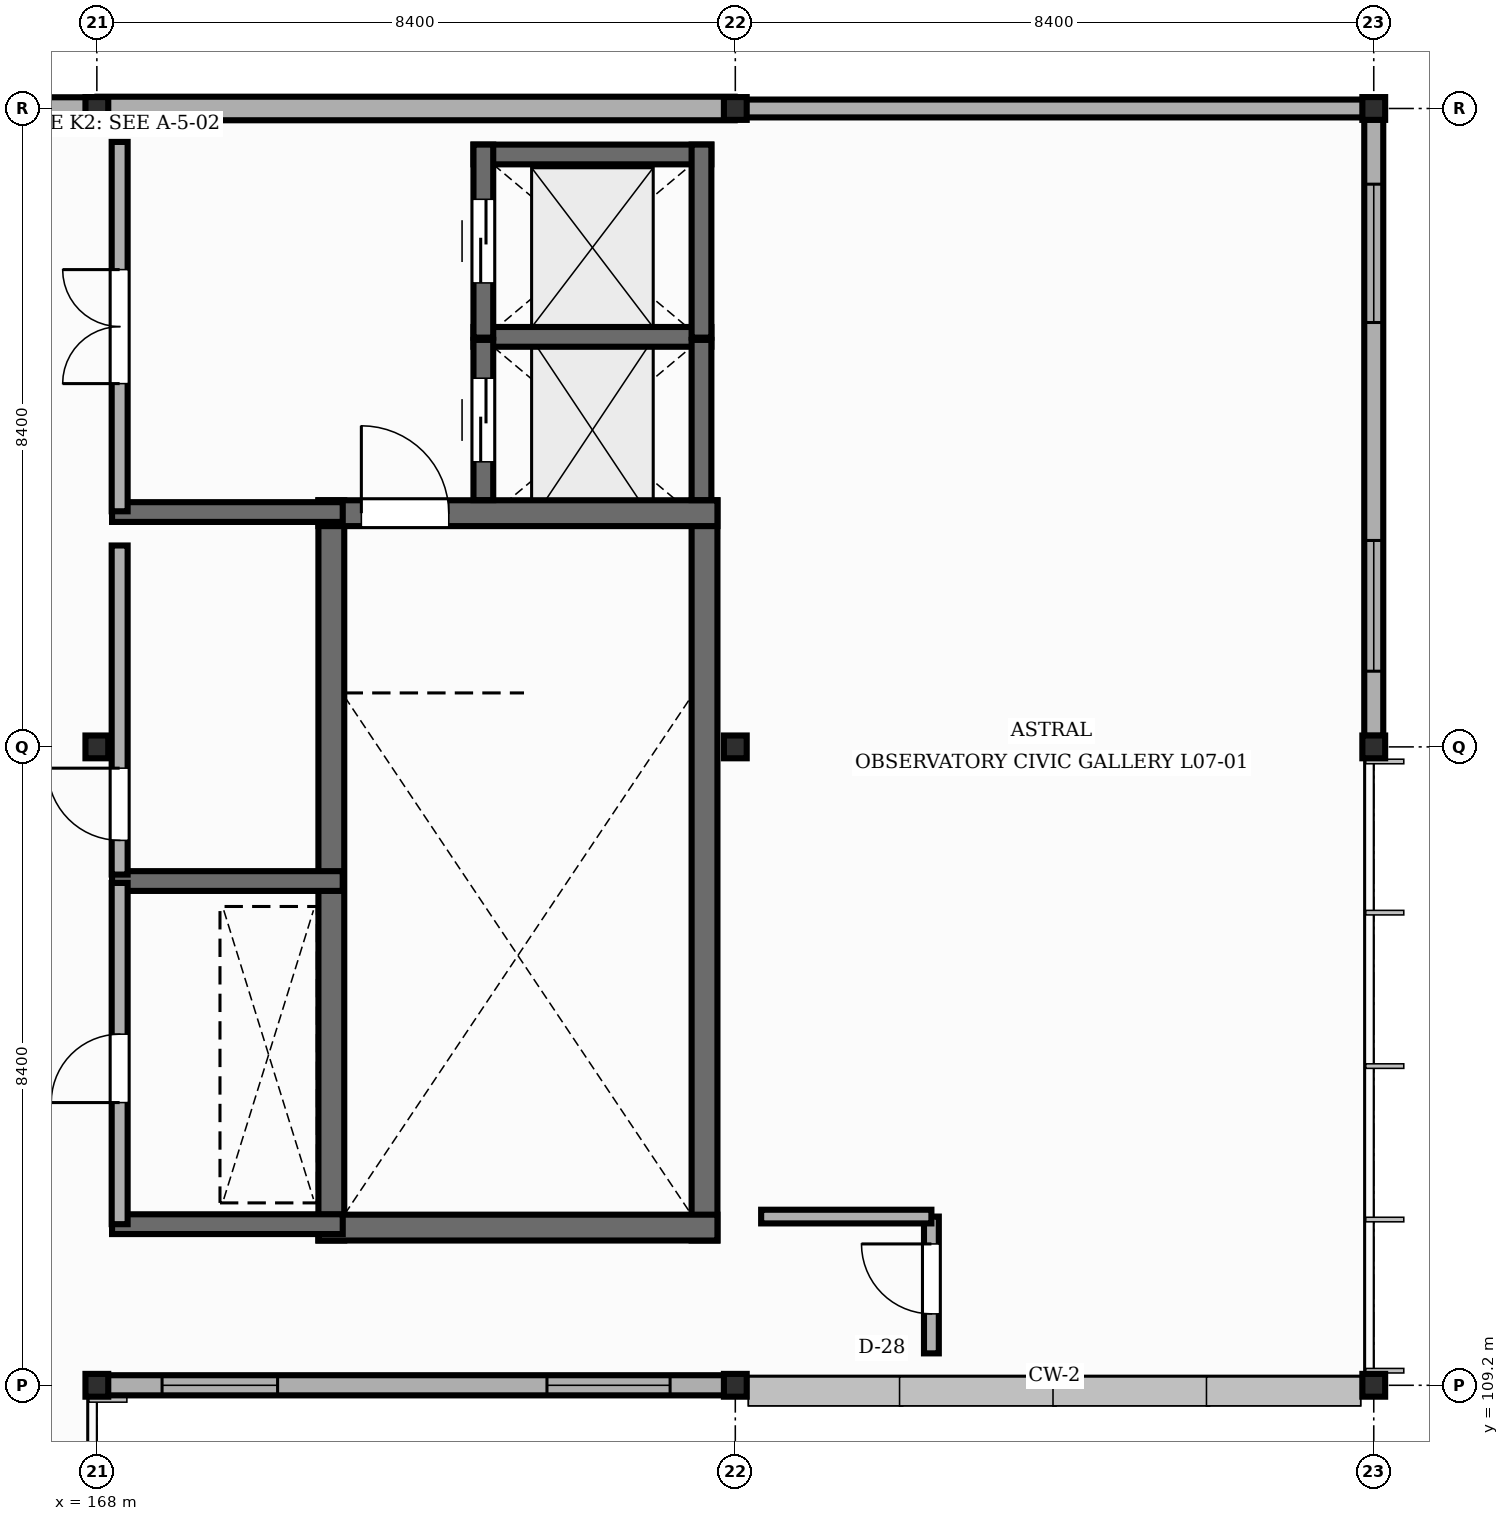
"""IFC4 building model, lengths in metres.
Left out: names, types, materials, properties, quantities, classifications, styles, units other than length and angle.
Written with IfcOpenShell. Run it as: python <this file> out.ifc"""

import sys

from ifc_helpers import new_model, si_unit, direction, frame, frame_2d, origin, origin_2d, place, context, subcontext, project, spatial, rectangle, i_section, extrude, element, fill, save


model = new_model("IFC4")
c1 = context("Model", 3, precision=1e-05, world=origin(), true_north=direction((0.0, 1.0)))
c2 = subcontext(c1, "Body", "Model", "MODEL_VIEW")
j1 = project(units=[si_unit("LENGTHUNIT", "METRE"), si_unit("PLANEANGLEUNIT", "RADIAN")], contexts=[c1])
p1 = place(None, origin())
s1 = spatial("IfcSite", under=j1, at=p1, CompositionType="ELEMENT")
p2 = place(p1, origin())
s2 = spatial("IfcBuilding", under=s1, at=p2, CompositionType="ELEMENT")
p3 = place(p2, frame((0.0, 0.0, 30.15)))
s3 = spatial("IfcBuildingStorey", under=s2, at=p3, CompositionType="ELEMENT", Elevation=30.15)
for number, where, z_axis, x_axis in (
    (1, (168.0, 109.2, 0.0), (0.0, 0.0, 1.0), (1.0, 0.0, 0.0)),
    (2, (168.0, 117.6, 0.0), (0.0, 0.0, 1.0), (1.0, 0.0, 0.0)),
    (3, (168.0, 126.0, 0.0), (0.0, 0.0, 1.0), (1.0, 0.0, 0.0)),
    (4, (176.4, 109.2, 0.0), (0.0, 0.0, 1.0), (1.0, 0.0, 0.0)),
    (5, (176.4, 117.6, 0.0), (0.0, 0.0, 1.0), (1.0, 0.0, 0.0)),
    (6, (176.4, 126.0, 0.0), (0.0, 0.0, 1.0), (1.0, 0.0, 0.0)),
    (7, (184.8, 109.2, 0.0), (0.0, 0.0, 1.0), (1.0, 0.0, 0.0)),
    (8, (184.8, 117.6, 0.0), (0.0, 0.0, 1.0), (1.0, 0.0, 0.0)),
    (9, (184.8, 126.0, 0.0), (0.0, 0.0, 1.0), (1.0, 0.0, 0.0)),
):
    element("IfcColumn", number, at=place(p3, frame(where, z_axis=z_axis, x_axis=x_axis)), inside=s3, PredefinedType="COLUMN", context=c2, shape_type="SweptSolid", body=[
        extrude(i_section(OverallWidth=0.3, OverallDepth=0.3, WebThickness=0.011, FlangeThickness=0.019, FilletRadius=0.027, at=origin_2d()), origin(), (0.0, 0.0, 1.0), 4.2),
    ])
p4 = place(p3, frame((168.008, 109.2, 0.0), z_axis=(0.0, 0.0, 1.0), x_axis=(1.0, 0.0, 0.0)))
e10 = element("IfcWall", 10, at=p4, inside=s3, PredefinedType="STANDARD", context=c2, shape_type="SweptSolid", body=[
    extrude(rectangle(XDim=8.384, YDim=0.265, at=frame_2d((4.192, 0.0))), origin(), (0.0, 0.0, 1.0), 3.692),
])
p5 = place(p4, frame((0.85, 0.0, 0.9)))
e11 = element("IfcOpeningElement", 11, at=p5, cuts=e10, PredefinedType="OPENING", context=c2, shape_type="SweptSolid", body=[
    extrude(rectangle(XDim=1.52, YDim=1.85, at=frame_2d((0.76, 0.925))), frame((0.0, 0.142, 0.0), z_axis=(0.0, -1.0, 0.0), x_axis=(1.0, 0.0, 0.0)), (0.0, 0.0, 1.0), 0.285),
])
p6 = place(p4, frame((5.914, 0.0, 0.9)))
e12 = element("IfcOpeningElement", 12, at=p6, cuts=e10, PredefinedType="OPENING", context=c2, shape_type="SweptSolid", body=[
    extrude(rectangle(XDim=1.62, YDim=1.85, at=frame_2d((0.81, 0.925))), frame((0.0, 0.142, 0.0), z_axis=(0.0, -1.0, 0.0), x_axis=(1.0, 0.0, 0.0)), (0.0, 0.0, 1.0), 0.285),
])
p7 = place(p3, frame((184.8, 117.746, 0.0), z_axis=(0.0, 0.0, 1.0), x_axis=(0.0, 1.0, 0.0)))
e13 = element("IfcWall", 13, at=p7, inside=s3, PredefinedType="STANDARD", context=c2, shape_type="SweptSolid", body=[
    extrude(rectangle(XDim=8.108, YDim=0.25, at=frame_2d((4.054, 0.0))), origin(), (0.0, 0.0, 1.0), 3.662),
])
p8 = place(p7, frame((0.85, 0.0, 0.9)))
e14 = element("IfcOpeningElement", 14, at=p8, cuts=e13, PredefinedType="OPENING", context=c2, shape_type="SweptSolid", body=[
    extrude(rectangle(XDim=1.72, YDim=1.85, at=frame_2d((0.86, 0.925))), frame((0.0, 0.135, 0.0), z_axis=(0.0, -1.0, 0.0), x_axis=(1.0, 0.0, 0.0)), (0.0, 0.0, 1.0), 0.27),
])
p9 = place(p7, frame((5.438, 0.0, 0.9)))
e15 = element("IfcOpeningElement", 15, at=p9, cuts=e13, PredefinedType="OPENING", context=c2, shape_type="SweptSolid", body=[
    extrude(rectangle(XDim=1.82, YDim=1.85, at=frame_2d((0.91, 0.925))), frame((0.0, 0.135, 0.0), z_axis=(0.0, -1.0, 0.0), x_axis=(1.0, 0.0, 0.0)), (0.0, 0.0, 1.0), 0.27),
])
p10 = place(p3, frame((184.792, 126.0, 0.0), z_axis=(0.0, 0.0, 1.0), x_axis=(-1.0, 0.0, 0.0)))
e16 = element("IfcWall", 16, at=p10, inside=s3, PredefinedType="STANDARD", context=c2, shape_type="SweptSolid", body=[
    extrude(rectangle(XDim=8.384, YDim=0.235, at=frame_2d((4.192, 0.0))), origin(), (0.0, 0.0, 1.0), 3.662),
])
p11 = place(p3, frame((176.392, 126.0, 0.0), z_axis=(0.0, 0.0, 1.0), x_axis=(-1.0, 0.0, 0.0)))
e17 = element("IfcWall", 17, at=p11, inside=s3, PredefinedType="STANDARD", context=c2, shape_type="SweptSolid", body=[
    extrude(rectangle(XDim=8.384, YDim=0.31, at=frame_2d((4.192, 0.0))), origin(), (0.0, 0.0, 1.0), 3.692),
])
p12 = place(p3, frame((167.992, 126.0, 0.0), z_axis=(0.0, 0.0, 1.0), x_axis=(-1.0, 0.0, 0.0)))
e18 = element("IfcWall", 18, at=p12, inside=s3, PredefinedType="STANDARD", context=c2, shape_type="SweptSolid", body=[
    extrude(rectangle(XDim=8.384, YDim=0.295, at=frame_2d((4.192, 0.0))), origin(), (0.0, 0.0, 1.0), 3.662),
])
for number, where, z_axis, x_axis in (
    (19, (171.085, 111.105, 0.0), (0.0, 0.0, 1.0), (0.0, 1.0, 0.0)),
    (20, (175.995, 111.105, 0.0), (0.0, 0.0, 1.0), (0.0, 1.0, 0.0)),
):
    element("IfcWall", number, at=place(p3, frame(where, z_axis=z_axis, x_axis=x_axis)), inside=s3, PredefinedType="SHEAR", context=c2, shape_type="SweptSolid", body=[
        extrude(rectangle(XDim=9.74, YDim=0.34, at=frame_2d((4.87, 0.0))), origin(), (0.0, 0.0, 1.0), 4.0),
    ])
p13 = place(p3, frame((170.915, 111.275, 0.0), z_axis=(0.0, 0.0, 1.0), x_axis=(1.0, 0.0, 0.0)))
e21 = element("IfcWall", 21, at=p13, inside=s3, PredefinedType="SHEAR", context=c2, shape_type="SweptSolid", body=[
    extrude(rectangle(XDim=5.25, YDim=0.34, at=frame_2d((2.625, 0.0))), origin(), (0.0, 0.0, 1.0), 4.0),
])
p14 = place(p3, frame((170.915, 120.675, 0.0), z_axis=(0.0, 0.0, 1.0), x_axis=(1.0, 0.0, 0.0)))
e22 = element("IfcWall", 22, at=p14, inside=s3, PredefinedType="SHEAR", context=c2, shape_type="SweptSolid", body=[
    extrude(rectangle(XDim=5.25, YDim=0.34, at=frame_2d((2.625, 0.0))), origin(), (0.0, 0.0, 1.0), 4.0),
])
p15 = place(p14, frame((0.565, 0.0, 0.0)))
e23 = element("IfcOpeningElement", 23, at=p15, cuts=e22, PredefinedType="OPENING", context=c2, shape_type="SweptSolid", body=[
    extrude(rectangle(XDim=1.15, YDim=2.15, at=frame_2d((0.575, 1.075))), frame((0.0, 0.18, 0.0), z_axis=(0.0, -1.0, 0.0), x_axis=(1.0, 0.0, 0.0)), (0.0, 0.0, 1.0), 0.36),
])
p16 = place(p3, frame((172.955, 122.995, 0.0), z_axis=(0.0, 0.0, 1.0), x_axis=(1.0, 0.0, 0.0)))
e24 = element("IfcWall", 24, at=p16, inside=s3, PredefinedType="SHEAR", context=c2, shape_type="SweptSolid", body=[
    extrude(rectangle(XDim=3.13, YDim=0.26, at=frame_2d((1.565, 0.0))), origin(), (0.0, 0.0, 1.0), 4.0),
])
p17 = place(p3, frame((175.955, 120.847, 0.0), z_axis=(0.0, 0.0, 1.0), x_axis=(0.0, 1.0, 0.0)))
e25 = element("IfcWall", 25, at=p17, inside=s3, PredefinedType="SHEAR", context=c2, shape_type="SweptSolid", body=[
    extrude(rectangle(XDim=2.108, YDim=0.26, at=frame_2d((1.054, 0.0))), origin(), (0.0, 0.0, 1.0), 4.0),
])
p18 = place(p3, frame((173.085, 120.847, 0.0), z_axis=(0.0, 0.0, 1.0), x_axis=(0.0, 1.0, 0.0)))
e26 = element("IfcWall", 26, at=p18, inside=s3, PredefinedType="SHEAR", context=c2, shape_type="SweptSolid", body=[
    extrude(rectangle(XDim=2.108, YDim=0.26, at=frame_2d((1.054, 0.0))), origin(), (0.0, 0.0, 1.0), 4.0),
])
p19 = place(p18, frame((0.504, 0.0, 0.0)))
e27 = element("IfcOpeningElement", 27, at=p19, cuts=e26, PredefinedType="OPENING", context=c2, shape_type="SweptSolid", body=[
    extrude(rectangle(XDim=1.1, YDim=2.15, at=frame_2d((0.55, 1.075))), frame((0.0, 0.14, 0.0), z_axis=(0.0, -1.0, 0.0), x_axis=(1.0, 0.0, 0.0)), (0.0, 0.0, 1.0), 0.28),
])
p20 = place(p3, frame((172.955, 125.395, 0.0), z_axis=(0.0, 0.0, 1.0), x_axis=(1.0, 0.0, 0.0)))
e28 = element("IfcWall", 28, at=p20, inside=s3, PredefinedType="SHEAR", context=c2, shape_type="SweptSolid", body=[
    extrude(rectangle(XDim=3.13, YDim=0.26, at=frame_2d((1.565, 0.0))), origin(), (0.0, 0.0, 1.0), 4.0),
])
p21 = place(p3, frame((175.955, 122.985, 0.0), z_axis=(0.0, 0.0, 1.0), x_axis=(0.0, 1.0, 0.0)))
e29 = element("IfcWall", 29, at=p21, inside=s3, PredefinedType="SHEAR", context=c2, shape_type="SweptSolid", body=[
    extrude(rectangle(XDim=2.54, YDim=0.26, at=frame_2d((1.27, 0.0))), origin(), (0.0, 0.0, 1.0), 4.0),
])
p22 = place(p3, frame((173.085, 122.985, 0.0), z_axis=(0.0, 0.0, 1.0), x_axis=(0.0, 1.0, 0.0)))
e30 = element("IfcWall", 30, at=p22, inside=s3, PredefinedType="SHEAR", context=c2, shape_type="SweptSolid", body=[
    extrude(rectangle(XDim=2.54, YDim=0.26, at=frame_2d((1.27, 0.0))), origin(), (0.0, 0.0, 1.0), 4.0),
])
p23 = place(p22, frame((0.72, 0.0, 0.0)))
e31 = element("IfcOpeningElement", 31, at=p23, cuts=e30, PredefinedType="OPENING", context=c2, shape_type="SweptSolid", body=[
    extrude(rectangle(XDim=1.1, YDim=2.15, at=frame_2d((0.55, 1.075))), frame((0.0, 0.14, 0.0), z_axis=(0.0, -1.0, 0.0), x_axis=(1.0, 0.0, 0.0)), (0.0, 0.0, 1.0), 0.28),
])
for number, where, z_axis, x_axis in (
    (32, (168.2, 111.32, 0.0), (0.0, 0.0, 1.0), (1.0, 0.0, 0.0)),
    (33, (168.2, 115.835, 0.0), (0.0, 0.0, 1.0), (1.0, 0.0, 0.0)),
    (34, (168.2, 120.69, 0.0), (0.0, 0.0, 1.0), (1.0, 0.0, 0.0)),
):
    element("IfcWall", number, at=place(p3, frame(where, z_axis=z_axis, x_axis=x_axis)), inside=s3, PredefinedType="SHEAR", context=c2, shape_type="SweptSolid", body=[
        extrude(rectangle(XDim=3.035, YDim=0.26, at=frame_2d((1.518, 0.0))), origin(), (0.0, 0.0, 1.0), 4.0),
    ])
p24 = place(p3, frame((168.3, 111.32, 0.0), z_axis=(0.0, 0.0, 1.0), x_axis=(0.0, 1.0, 0.0)))
e35 = element("IfcWall", 35, at=p24, inside=s3, PredefinedType="STANDARD", context=c2, shape_type="SweptSolid", body=[
    extrude(rectangle(XDim=4.49, YDim=0.21, at=frame_2d((2.245, 0.0))), origin(), (0.0, 0.0, 1.0), 3.752),
])
p25 = place(p24, frame((1.6, 0.0, 0.0)))
e36 = element("IfcOpeningElement", 36, at=p25, cuts=e35, PredefinedType="OPENING", context=c2, shape_type="SweptSolid", body=[
    extrude(rectangle(XDim=0.9, YDim=2.1, at=frame_2d((0.45, 1.05))), frame((0.0, 0.115, 0.0), z_axis=(0.0, -1.0, 0.0), x_axis=(1.0, 0.0, 0.0)), (0.0, 0.0, 1.0), 0.23),
])
p26 = place(p3, frame((168.3, 115.92, 0.0), z_axis=(0.0, 0.0, 1.0), x_axis=(0.0, 1.0, 0.0)))
e37 = element("IfcWall", 37, at=p26, inside=s3, PredefinedType="STANDARD", context=c2, shape_type="SweptSolid", body=[
    extrude(rectangle(XDim=4.33, YDim=0.21, at=frame_2d((2.165, 0.0))), origin(), (0.0, 0.0, 1.0), 3.662),
])
p27 = place(p26, frame((0.45, 0.0, 0.0)))
e38 = element("IfcOpeningElement", 38, at=p27, cuts=e37, PredefinedType="OPENING", context=c2, shape_type="SweptSolid", body=[
    extrude(rectangle(XDim=0.95, YDim=2.15, at=frame_2d((0.475, 1.075))), frame((0.0, 0.115, 0.0), z_axis=(0.0, -1.0, 0.0), x_axis=(1.0, 0.0, 0.0)), (0.0, 0.0, 1.0), 0.23),
])
p28 = place(p3, frame((168.3, 120.7, 0.0), z_axis=(0.0, 0.0, 1.0), x_axis=(0.0, 1.0, 0.0)))
e39 = element("IfcWall", 39, at=p28, inside=s3, PredefinedType="STANDARD", context=c2, shape_type="SweptSolid", body=[
    extrude(rectangle(XDim=4.86, YDim=0.21, at=frame_2d((2.43, 0.0))), origin(), (0.0, 0.0, 1.0), 3.662),
])
p29 = place(p28, frame((1.68, 0.0, 0.0)))
e40 = element("IfcOpeningElement", 40, at=p29, cuts=e39, PredefinedType="OPENING", context=c2, shape_type="SweptSolid", body=[
    extrude(rectangle(XDim=1.5, YDim=2.2, at=frame_2d((0.75, 1.1))), frame((0.0, 0.115, 0.0), z_axis=(0.0, -1.0, 0.0), x_axis=(1.0, 0.0, 0.0)), (0.0, 0.0, 1.0), 0.23),
])
p30 = place(p3, frame((178.98, 109.62, -0.004), z_axis=(0.0, 0.0, 1.0), x_axis=(0.0, 1.0, 0.0)))
e41 = element("IfcWall", 41, at=p30, inside=s3, PredefinedType="STANDARD", context=c2, shape_type="SweptSolid", body=[
    extrude(rectangle(XDim=1.8, YDim=0.195, at=frame_2d((0.9, 0.0))), origin(), (0.0, 0.0, 1.0), 4.004),
])
p31 = place(p30, frame((0.52, 0.0, 0.0)))
e42 = element("IfcOpeningElement", 42, at=p31, cuts=e41, PredefinedType="OPENING", context=c2, shape_type="SweptSolid", body=[
    extrude(rectangle(XDim=0.92, YDim=2.3, at=frame_2d((0.46, 1.15))), frame((0.0, 0.107, 0.0), z_axis=(0.0, -1.0, 0.0), x_axis=(1.0, 0.0, 0.0)), (0.0, 0.0, 1.0), 0.215),
])
p32 = place(p3, frame((178.98, 111.42, -0.004), z_axis=(0.0, 0.0, 1.0), x_axis=(-1.0, 0.0, 0.0)))
e43 = element("IfcWall", 43, at=p32, inside=s3, PredefinedType="STANDARD", context=c2, shape_type="SweptSolid", body=[
    extrude(rectangle(XDim=2.24, YDim=0.18, at=frame_2d((1.12, 0.0))), origin(), (0.0, 0.0, 1.0), 4.004),
])
p33 = place(p5, origin())
e44 = element("IfcWindow", 44, at=p33, inside=s3, PartitioningType="SINGLE_PANEL", PredefinedType="WINDOW", context=c2, shape_type="SweptSolid", body=[
    extrude(rectangle(XDim=1.52, YDim=1.85, at=frame_2d((0.76, 0.925))), frame((0.0, 0.03, 0.0), z_axis=(0.0, -1.0, 0.0), x_axis=(1.0, 0.0, 0.0)), (0.0, 0.0, 1.0), 0.06),
])
fill(e11, e44)
p34 = place(p6, origin())
e45 = element("IfcWindow", 45, at=p34, inside=s3, PartitioningType="SINGLE_PANEL", PredefinedType="WINDOW", context=c2, shape_type="SweptSolid", body=[
    extrude(rectangle(XDim=1.62, YDim=1.85, at=frame_2d((0.81, 0.925))), frame((0.0, 0.03, 0.0), z_axis=(0.0, -1.0, 0.0), x_axis=(1.0, 0.0, 0.0)), (0.0, 0.0, 1.0), 0.06),
])
fill(e12, e45)
p35 = place(p8, origin())
e46 = element("IfcWindow", 46, at=p35, inside=s3, PartitioningType="SINGLE_PANEL", PredefinedType="WINDOW", context=c2, shape_type="SweptSolid", body=[
    extrude(rectangle(XDim=1.72, YDim=1.85, at=frame_2d((0.86, 0.925))), frame((0.0, 0.03, 0.0), z_axis=(0.0, -1.0, 0.0), x_axis=(1.0, 0.0, 0.0)), (0.0, 0.0, 1.0), 0.06),
])
fill(e14, e46)
p36 = place(p9, origin())
e47 = element("IfcWindow", 47, at=p36, inside=s3, PartitioningType="SINGLE_PANEL", PredefinedType="WINDOW", context=c2, shape_type="SweptSolid", body=[
    extrude(rectangle(XDim=1.82, YDim=1.85, at=frame_2d((0.91, 0.925))), frame((0.0, 0.03, 0.0), z_axis=(0.0, -1.0, 0.0), x_axis=(1.0, 0.0, 0.0)), (0.0, 0.0, 1.0), 0.06),
])
fill(e15, e47)
p37 = place(p15, origin())
e48 = element("IfcDoor", 48, at=p37, inside=s3, OperationType="SINGLE_SWING_LEFT", PredefinedType="DOOR", context=c2, shape_type="SweptSolid", body=[
    extrude(rectangle(XDim=1.15, YDim=2.15, at=frame_2d((0.575, 1.075))), frame((0.0, 0.025, 0.0), z_axis=(0.0, -1.0, 0.0), x_axis=(1.0, 0.0, 0.0)), (0.0, 0.0, 1.0), 0.05),
])
fill(e23, e48)
p38 = place(p19, origin())
e49 = element("IfcDoor", 49, at=p38, inside=s3, OperationType="DOUBLE_DOOR_SLIDING", PredefinedType="DOOR", context=c2, shape_type="SweptSolid", body=[
    extrude(rectangle(XDim=1.1, YDim=2.15, at=frame_2d((0.55, 1.075))), frame((0.0, 0.025, 0.0), z_axis=(0.0, -1.0, 0.0), x_axis=(1.0, 0.0, 0.0)), (0.0, 0.0, 1.0), 0.05),
])
fill(e27, e49)
p39 = place(p23, origin())
e50 = element("IfcDoor", 50, at=p39, inside=s3, OperationType="DOUBLE_DOOR_SLIDING", PredefinedType="DOOR", context=c2, shape_type="SweptSolid", body=[
    extrude(rectangle(XDim=1.1, YDim=2.15, at=frame_2d((0.55, 1.075))), frame((0.0, 0.025, 0.0), z_axis=(0.0, -1.0, 0.0), x_axis=(1.0, 0.0, 0.0)), (0.0, 0.0, 1.0), 0.05),
])
fill(e31, e50)
p40 = place(p25, origin())
e51 = element("IfcDoor", 51, at=p40, inside=s3, OperationType="SINGLE_SWING_LEFT", PredefinedType="DOOR", context=c2, shape_type="SweptSolid", body=[
    extrude(rectangle(XDim=0.9, YDim=2.1, at=frame_2d((0.45, 1.05))), frame((0.0, 0.025, 0.0), z_axis=(0.0, -1.0, 0.0), x_axis=(1.0, 0.0, 0.0)), (0.0, 0.0, 1.0), 0.05),
])
fill(e36, e51)
p41 = place(p27, origin())
e52 = element("IfcDoor", 52, at=p41, inside=s3, OperationType="SINGLE_SWING_RIGHT", PredefinedType="DOOR", context=c2, shape_type="SweptSolid", body=[
    extrude(rectangle(XDim=0.95, YDim=2.15, at=frame_2d((0.475, 1.075))), frame((0.0, 0.025, 0.0), z_axis=(0.0, -1.0, 0.0), x_axis=(1.0, 0.0, 0.0)), (0.0, 0.0, 1.0), 0.05),
])
fill(e38, e52)
p42 = place(p29, origin())
e53 = element("IfcDoor", 53, at=p42, inside=s3, OperationType="DOUBLE_DOOR_SINGLE_SWING", PredefinedType="DOOR", context=c2, shape_type="SweptSolid", body=[
    extrude(rectangle(XDim=1.5, YDim=2.2, at=frame_2d((0.75, 1.1))), frame((0.0, 0.025, 0.0), z_axis=(0.0, -1.0, 0.0), x_axis=(1.0, 0.0, 0.0)), (0.0, 0.0, 1.0), 0.05),
])
fill(e40, e53)
p43 = place(p31, origin())
e54 = element("IfcDoor", 54, at=p43, inside=s3, OperationType="SINGLE_SWING_RIGHT", PredefinedType="DOOR", context=c2, shape_type="SweptSolid", body=[
    extrude(rectangle(XDim=0.92, YDim=2.3, at=frame_2d((0.46, 1.15))), frame((0.0, 0.025, 0.0), z_axis=(0.0, -1.0, 0.0), x_axis=(1.0, 0.0, 0.0)), (0.0, 0.0, 1.0), 0.05),
])
fill(e42, e54)
save(model, sys.argv[1])
